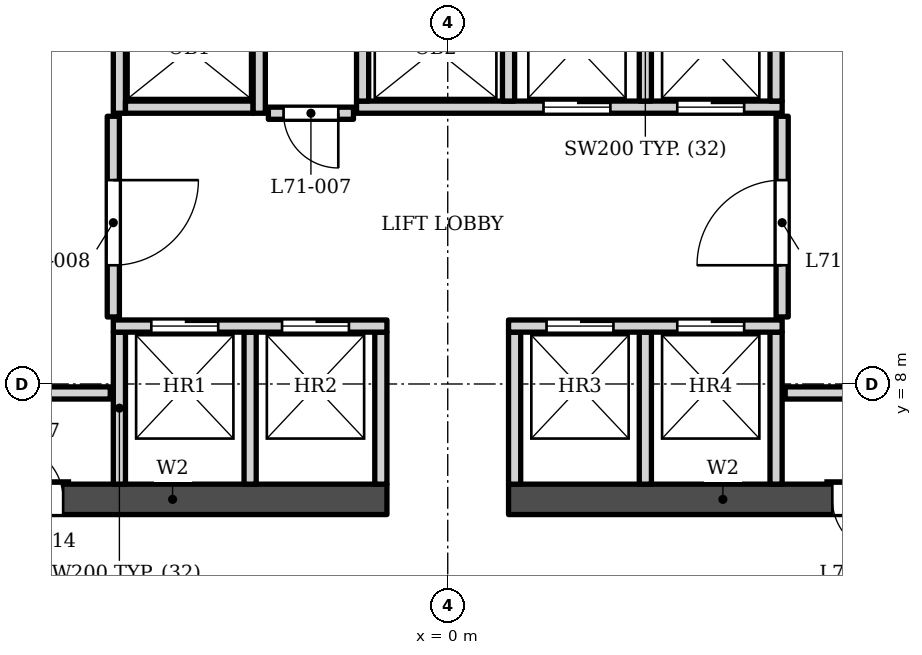
"""IFC4 building model, lengths in metres.
Left out: names, types, materials, properties, quantities, classifications, styles, units other than length and angle.
Written with IfcOpenShell. Run it as: python <this file> out.ifc"""

import sys

from ifc_helpers import new_model, si_unit, direction, frame, frame_2d, origin, place, context, subcontext, project, spatial, rectangle, extrude, element, fill, save


model = new_model("IFC4")
c1 = context("Model", 3, precision=1e-05, world=origin(), true_north=direction((0.0, 1.0)))
c2 = subcontext(c1, "Body", "Model", "MODEL_VIEW")
j1 = project(units=[si_unit("LENGTHUNIT", "METRE"), si_unit("PLANEANGLEUNIT", "RADIAN")], contexts=[c1])
p1 = place(None, origin())
s1 = spatial("IfcSite", under=j1, at=p1, CompositionType="ELEMENT")
p2 = place(p1, origin())
s2 = spatial("IfcBuilding", under=s1, at=p2, CompositionType="ELEMENT")
p3 = place(p2, frame((0.0, 0.0, 295.0)))
s3 = spatial("IfcBuildingStorey", under=s2, at=p3, CompositionType="ELEMENT", Elevation=295.0)
p4 = place(p3, frame((-8.05, 6.103, 0.0), z_axis=(0.0, 0.0, 1.0), x_axis=(1.0, 0.0, 0.0)))
e1 = element("IfcWall", 1, at=p4, inside=s3, PredefinedType="SHEAR", context=c2, shape_type="SweptSolid", body=[
    extrude(rectangle(XDim=7.05, YDim=0.5, at=frame_2d((3.525, 0.0))), origin(), (0.0, 0.0, 1.0), 7.5),
])
p5 = place(p4, frame((0.825, 0.0, 0.0)))
e2 = element("IfcOpeningElement", 2, at=p5, cuts=e1, PredefinedType="OPENING", context=c2, shape_type="SweptSolid", body=[
    extrude(rectangle(XDim=0.9, YDim=2.1, at=frame_2d((0.45, 1.05))), frame((0.0, 0.26, 0.0), z_axis=(0.0, -1.0, 0.0), x_axis=(1.0, 0.0, 0.0)), (0.0, 0.0, 1.0), 0.52),
])
p6 = place(p3, frame((1.0, 6.103, 0.0), z_axis=(0.0, 0.0, 1.0), x_axis=(1.0, 0.0, 0.0)))
e3 = element("IfcWall", 3, at=p6, inside=s3, PredefinedType="SHEAR", context=c2, shape_type="SweptSolid", body=[
    extrude(rectangle(XDim=7.05, YDim=0.5, at=frame_2d((3.525, 0.0))), origin(), (0.0, 0.0, 1.0), 7.5),
])
p7 = place(p6, frame((5.325, 0.0, 0.0)))
e4 = element("IfcOpeningElement", 4, at=p7, cuts=e3, PredefinedType="OPENING", context=c2, shape_type="SweptSolid", body=[
    extrude(rectangle(XDim=0.9, YDim=2.1, at=frame_2d((0.45, 1.05))), frame((0.0, 0.26, 0.0), z_axis=(0.0, -1.0, 0.0), x_axis=(1.0, 0.0, 0.0)), (0.0, 0.0, 1.0), 0.52),
])
for number, where, z_axis, x_axis in (
    (5, (-5.4, 6.353, 0.0), (0.0, 0.0, 1.0), (0.0, 1.0, 0.0)),
    (6, (-3.25, 6.353, 0.0), (0.0, 0.0, 1.0), (0.0, 1.0, 0.0)),
    (7, (-1.1, 6.353, 0.0), (0.0, 0.0, 1.0), (0.0, 1.0, 0.0)),
    (8, (1.1, 6.353, 0.0), (0.0, 0.0, 1.0), (0.0, 1.0, 0.0)),
    (9, (3.25, 6.353, 0.0), (0.0, 0.0, 1.0), (0.0, 1.0, 0.0)),
    (10, (5.4, 6.353, 0.0), (0.0, 0.0, 1.0), (0.0, 1.0, 0.0)),
    (11, (-8.05, 7.853, 0.0), (0.0, 0.0, 1.0), (1.0, 0.0, 0.0)),
    (12, (5.55, 7.853, 0.0), (0.0, 0.0, 1.0), (1.0, 0.0, 0.0)),
):
    element("IfcWall", number, at=place(p3, frame(where, z_axis=z_axis, x_axis=x_axis)), inside=s3, PredefinedType="SOLIDWALL", context=c2, shape_type="SweptSolid", body=[
        extrude(rectangle(XDim=2.5, YDim=0.2, at=frame_2d((1.25, 0.0))), origin(), (0.0, 0.0, 1.0), 7.2),
    ])
p8 = place(p3, frame((-5.5, 8.953, 0.0), z_axis=(0.0, 0.0, 1.0), x_axis=(1.0, 0.0, 0.0)))
e13 = element("IfcWall", 13, at=p8, inside=s3, PredefinedType="SOLIDWALL", context=c2, shape_type="SweptSolid", body=[
    extrude(rectangle(XDim=4.5, YDim=0.2, at=frame_2d((2.25, 0.0))), origin(), (0.0, 0.0, 1.0), 7.2),
])
p9 = place(p8, frame((0.625, 0.0, 0.0)))
e14 = element("IfcOpeningElement", 14, at=p9, cuts=e13, PredefinedType="OPENING", context=c2, shape_type="SweptSolid", body=[
    extrude(rectangle(XDim=1.1, YDim=2.1, at=frame_2d((0.55, 1.05))), frame((0.0, 0.11, 0.0), z_axis=(0.0, -1.0, 0.0), x_axis=(1.0, 0.0, 0.0)), (0.0, 0.0, 1.0), 0.22),
])
p10 = place(p8, frame((2.775, 0.0, 0.0)))
e15 = element("IfcOpeningElement", 15, at=p10, cuts=e13, PredefinedType="OPENING", context=c2, shape_type="SweptSolid", body=[
    extrude(rectangle(XDim=1.1, YDim=2.1, at=frame_2d((0.55, 1.05))), frame((0.0, 0.11, 0.0), z_axis=(0.0, -1.0, 0.0), x_axis=(1.0, 0.0, 0.0)), (0.0, 0.0, 1.0), 0.22),
])
p11 = place(p3, frame((1.0, 8.953, 0.0), z_axis=(0.0, 0.0, 1.0), x_axis=(1.0, 0.0, 0.0)))
e16 = element("IfcWall", 16, at=p11, inside=s3, PredefinedType="SOLIDWALL", context=c2, shape_type="SweptSolid", body=[
    extrude(rectangle(XDim=4.5, YDim=0.2, at=frame_2d((2.25, 0.0))), origin(), (0.0, 0.0, 1.0), 7.2),
])
p12 = place(p11, frame((0.625, 0.0, 0.0)))
e17 = element("IfcOpeningElement", 17, at=p12, cuts=e16, PredefinedType="OPENING", context=c2, shape_type="SweptSolid", body=[
    extrude(rectangle(XDim=1.1, YDim=2.1, at=frame_2d((0.55, 1.05))), frame((0.0, 0.11, 0.0), z_axis=(0.0, -1.0, 0.0), x_axis=(1.0, 0.0, 0.0)), (0.0, 0.0, 1.0), 0.22),
])
p13 = place(p11, frame((2.775, 0.0, 0.0)))
e18 = element("IfcOpeningElement", 18, at=p13, cuts=e16, PredefinedType="OPENING", context=c2, shape_type="SweptSolid", body=[
    extrude(rectangle(XDim=1.1, YDim=2.1, at=frame_2d((0.55, 1.05))), frame((0.0, 0.11, 0.0), z_axis=(0.0, -1.0, 0.0), x_axis=(1.0, 0.0, 0.0)), (0.0, 0.0, 1.0), 0.22),
])
p14 = place(p3, frame((-5.5, 9.103, 0.0), z_axis=(0.0, 0.0, 1.0), x_axis=(0.0, 1.0, 0.0)))
e19 = element("IfcWall", 19, at=p14, inside=s3, PredefinedType="SOLIDWALL", context=c2, shape_type="SweptSolid", body=[
    extrude(rectangle(XDim=3.3, YDim=0.2, at=frame_2d((1.65, 0.0))), origin(), (0.0, 0.0, 1.0), 7.2),
])
p15 = place(p14, frame((0.85, 0.0, 0.0)))
e20 = element("IfcOpeningElement", 20, at=p15, cuts=e19, PredefinedType="OPENING", context=c2, shape_type="SweptSolid", body=[
    extrude(rectangle(XDim=1.4, YDim=2.1, at=frame_2d((0.7, 1.05))), frame((0.0, 0.11, 0.0), z_axis=(0.0, -1.0, 0.0), x_axis=(1.0, 0.0, 0.0)), (0.0, 0.0, 1.0), 0.22),
])
p16 = place(p3, frame((5.5, 9.103, 0.0), z_axis=(0.0, 0.0, 1.0), x_axis=(0.0, 1.0, 0.0)))
e21 = element("IfcWall", 21, at=p16, inside=s3, PredefinedType="SOLIDWALL", context=c2, shape_type="SweptSolid", body=[
    extrude(rectangle(XDim=3.3, YDim=0.2, at=frame_2d((1.65, 0.0))), origin(), (0.0, 0.0, 1.0), 7.2),
])
p17 = place(p16, frame((0.85, 0.0, 0.0)))
e22 = element("IfcOpeningElement", 22, at=p17, cuts=e21, PredefinedType="OPENING", context=c2, shape_type="SweptSolid", body=[
    extrude(rectangle(XDim=1.4, YDim=2.1, at=frame_2d((0.7, 1.05))), frame((0.0, 0.11, 0.0), z_axis=(0.0, -1.0, 0.0), x_axis=(1.0, 0.0, 0.0)), (0.0, 0.0, 1.0), 0.22),
])
p18 = place(p3, frame((-2.95, 12.453, 0.0), z_axis=(0.0, 0.0, 1.0), x_axis=(1.0, 0.0, 0.0)))
e23 = element("IfcWall", 23, at=p18, inside=s3, PredefinedType="SOLIDWALL", context=c2, shape_type="SweptSolid", body=[
    extrude(rectangle(XDim=1.4, YDim=0.2, at=frame_2d((0.7, 0.0))), origin(), (0.0, 0.0, 1.0), 7.2),
])
p19 = place(p18, frame((0.25, 0.0, 0.0)))
e24 = element("IfcOpeningElement", 24, at=p19, cuts=e23, PredefinedType="OPENING", context=c2, shape_type="SweptSolid", body=[
    extrude(rectangle(XDim=0.9, YDim=2.1, at=frame_2d((0.45, 1.05))), frame((0.0, 0.11, 0.0), z_axis=(0.0, -1.0, 0.0), x_axis=(1.0, 0.0, 0.0)), (0.0, 0.0, 1.0), 0.22),
])
p20 = place(p3, frame((-5.4, 12.453, 0.0), z_axis=(0.0, 0.0, 1.0), x_axis=(0.0, 1.0, 0.0)))
e25 = element("IfcWall", 25, at=p20, inside=s3, PredefinedType="SOLIDWALL", context=c2, shape_type="SweptSolid", body=[
    extrude(rectangle(XDim=3.0, YDim=0.2, at=frame_2d((1.5, 0.0))), origin(), (0.0, 0.0, 1.0), 7.2),
])
p21 = place(p3, frame((-5.3, 12.552, 0.0), z_axis=(0.0, 0.0, 1.0), x_axis=(1.0, 0.0, 0.0)))
e26 = element("IfcWall", 26, at=p21, inside=s3, PredefinedType="SOLIDWALL", context=c2, shape_type="SweptSolid", body=[
    extrude(rectangle(XDim=2.1, YDim=0.2, at=frame_2d((1.05, 0.0))), origin(), (0.0, 0.0, 1.0), 7.2),
])
p22 = place(p3, frame((-3.1, 12.453, 0.0), z_axis=(0.0, 0.0, 1.0), x_axis=(0.0, 1.0, 0.0)))
e27 = element("IfcWall", 27, at=p22, inside=s3, PredefinedType="SOLIDWALL", context=c2, shape_type="SweptSolid", body=[
    extrude(rectangle(XDim=3.0, YDim=0.2, at=frame_2d((1.5, 0.0))), origin(), (0.0, 0.0, 1.0), 7.2),
])
p23 = place(p3, frame((-1.5, 12.552, 0.0), z_axis=(0.0, 0.0, 1.0), x_axis=(1.0, 0.0, 0.0)))
e28 = element("IfcWall", 28, at=p23, inside=s3, PredefinedType="SOLIDWALL", context=c2, shape_type="SweptSolid", body=[
    extrude(rectangle(XDim=7.0, YDim=0.2, at=frame_2d((3.5, 0.0))), origin(), (0.0, 0.0, 1.0), 7.2),
])
p24 = place(p23, frame((3.075, 0.0, 0.0)))
e29 = element("IfcOpeningElement", 29, at=p24, cuts=e28, PredefinedType="OPENING", context=c2, shape_type="SweptSolid", body=[
    extrude(rectangle(XDim=1.1, YDim=2.1, at=frame_2d((0.55, 1.05))), frame((0.0, 0.11, 0.0), z_axis=(0.0, -1.0, 0.0), x_axis=(1.0, 0.0, 0.0)), (0.0, 0.0, 1.0), 0.22),
])
p25 = place(p23, frame((5.275, 0.0, 0.0)))
e30 = element("IfcOpeningElement", 30, at=p25, cuts=e28, PredefinedType="OPENING", context=c2, shape_type="SweptSolid", body=[
    extrude(rectangle(XDim=1.1, YDim=2.1, at=frame_2d((0.55, 1.05))), frame((0.0, 0.11, 0.0), z_axis=(0.0, -1.0, 0.0), x_axis=(1.0, 0.0, 0.0)), (0.0, 0.0, 1.0), 0.22),
])
for number, where, z_axis, x_axis in (
    (31, (-1.4, 12.653, 0.0), (0.0, 0.0, 1.0), (0.0, 1.0, 0.0)),
    (32, (1.0, 12.653, 0.0), (0.0, 0.0, 1.0), (0.0, 1.0, 0.0)),
    (33, (3.25, 12.653, 0.0), (0.0, 0.0, 1.0), (0.0, 1.0, 0.0)),
):
    element("IfcWall", number, at=place(p3, frame(where, z_axis=z_axis, x_axis=x_axis)), inside=s3, PredefinedType="SOLIDWALL", context=c2, shape_type="SweptSolid", body=[
        extrude(rectangle(XDim=2.6, YDim=0.2, at=frame_2d((1.3, 0.0))), origin(), (0.0, 0.0, 1.0), 7.2),
    ])
p26 = place(p3, frame((5.4, 12.653, 0.0), z_axis=(0.0, 0.0, 1.0), x_axis=(0.0, 1.0, 0.0)))
e34 = element("IfcWall", 34, at=p26, inside=s3, PredefinedType="SOLIDWALL", context=c2, shape_type="SweptSolid", body=[
    extrude(rectangle(XDim=1.6, YDim=0.2, at=frame_2d((0.8, 0.0))), origin(), (0.0, 0.0, 1.0), 7.2),
])
p27 = place(p9, origin())
e35 = element("IfcDoor", 35, at=p27, inside=s3, OperationType="DOUBLE_DOOR_SLIDING", PredefinedType="DOOR", context=c2, shape_type="SweptSolid", body=[
    extrude(rectangle(XDim=1.1, YDim=2.1, at=frame_2d((0.55, 1.05))), frame((0.0, 0.025, 0.0), z_axis=(0.0, -1.0, 0.0), x_axis=(1.0, 0.0, 0.0)), (0.0, 0.0, 1.0), 0.05),
])
fill(e14, e35)
p28 = place(p10, origin())
e36 = element("IfcDoor", 36, at=p28, inside=s3, OperationType="DOUBLE_DOOR_SLIDING", PredefinedType="DOOR", context=c2, shape_type="SweptSolid", body=[
    extrude(rectangle(XDim=1.1, YDim=2.1, at=frame_2d((0.55, 1.05))), frame((0.0, 0.025, 0.0), z_axis=(0.0, -1.0, 0.0), x_axis=(1.0, 0.0, 0.0)), (0.0, 0.0, 1.0), 0.05),
])
fill(e15, e36)
p29 = place(p12, origin())
e37 = element("IfcDoor", 37, at=p29, inside=s3, OperationType="DOUBLE_DOOR_SLIDING", PredefinedType="DOOR", context=c2, shape_type="SweptSolid", body=[
    extrude(rectangle(XDim=1.1, YDim=2.1, at=frame_2d((0.55, 1.05))), frame((0.0, 0.025, 0.0), z_axis=(0.0, -1.0, 0.0), x_axis=(1.0, 0.0, 0.0)), (0.0, 0.0, 1.0), 0.05),
])
fill(e17, e37)
p30 = place(p13, origin())
e38 = element("IfcDoor", 38, at=p30, inside=s3, OperationType="DOUBLE_DOOR_SLIDING", PredefinedType="DOOR", context=c2, shape_type="SweptSolid", body=[
    extrude(rectangle(XDim=1.1, YDim=2.1, at=frame_2d((0.55, 1.05))), frame((0.0, 0.025, 0.0), z_axis=(0.0, -1.0, 0.0), x_axis=(1.0, 0.0, 0.0)), (0.0, 0.0, 1.0), 0.05),
])
fill(e18, e38)
p31 = place(p24, origin())
e39 = element("IfcDoor", 39, at=p31, inside=s3, OperationType="DOUBLE_DOOR_SLIDING", PredefinedType="DOOR", context=c2, shape_type="SweptSolid", body=[
    extrude(rectangle(XDim=1.1, YDim=2.1, at=frame_2d((0.55, 1.05))), frame((0.0, 0.025, 0.0), z_axis=(0.0, -1.0, 0.0), x_axis=(1.0, 0.0, 0.0)), (0.0, 0.0, 1.0), 0.05),
])
fill(e29, e39)
p32 = place(p25, origin())
e40 = element("IfcDoor", 40, at=p32, inside=s3, OperationType="DOUBLE_DOOR_SLIDING", PredefinedType="DOOR", context=c2, shape_type="SweptSolid", body=[
    extrude(rectangle(XDim=1.1, YDim=2.1, at=frame_2d((0.55, 1.05))), frame((0.0, 0.025, 0.0), z_axis=(0.0, -1.0, 0.0), x_axis=(1.0, 0.0, 0.0)), (0.0, 0.0, 1.0), 0.05),
])
fill(e30, e40)
p33 = place(p19, origin())
e41 = element("IfcDoor", 41, at=p33, inside=s3, OperationType="SINGLE_SWING_RIGHT", PredefinedType="DOOR", context=c2, shape_type="SweptSolid", body=[
    extrude(rectangle(XDim=0.9, YDim=2.1, at=frame_2d((0.45, 1.05))), frame((0.0, 0.025, 0.0), z_axis=(0.0, -1.0, 0.0), x_axis=(1.0, 0.0, 0.0)), (0.0, 0.0, 1.0), 0.05),
])
fill(e24, e41)
p34 = place(p15, origin())
e42 = element("IfcDoor", 42, at=p34, inside=s3, OperationType="SINGLE_SWING_RIGHT", PredefinedType="DOOR", context=c2, shape_type="SweptSolid", body=[
    extrude(rectangle(XDim=1.4, YDim=2.1, at=frame_2d((0.7, 1.05))), frame((0.0, 0.025, 0.0), z_axis=(0.0, -1.0, 0.0), x_axis=(1.0, 0.0, 0.0)), (0.0, 0.0, 1.0), 0.05),
])
fill(e20, e42)
p35 = place(p17, origin())
e43 = element("IfcDoor", 43, at=p35, inside=s3, OperationType="SINGLE_SWING_LEFT", PredefinedType="DOOR", context=c2, shape_type="SweptSolid", body=[
    extrude(rectangle(XDim=1.4, YDim=2.1, at=frame_2d((0.7, 1.05))), frame((0.0, 0.025, 0.0), z_axis=(0.0, -1.0, 0.0), x_axis=(1.0, 0.0, 0.0)), (0.0, 0.0, 1.0), 0.05),
])
fill(e22, e43)
p36 = place(p5, origin())
e44 = element("IfcDoor", 44, at=p36, inside=s3, OperationType="SINGLE_SWING_LEFT", PredefinedType="DOOR", context=c2, shape_type="SweptSolid", body=[
    extrude(rectangle(XDim=0.9, YDim=2.1, at=frame_2d((0.45, 1.05))), frame((0.0, 0.025, 0.0), z_axis=(0.0, -1.0, 0.0), x_axis=(1.0, 0.0, 0.0)), (0.0, 0.0, 1.0), 0.05),
])
fill(e2, e44)
p37 = place(p7, origin())
e45 = element("IfcDoor", 45, at=p37, inside=s3, OperationType="SINGLE_SWING_RIGHT", PredefinedType="DOOR", context=c2, shape_type="SweptSolid", body=[
    extrude(rectangle(XDim=0.9, YDim=2.1, at=frame_2d((0.45, 1.05))), frame((0.0, 0.025, 0.0), z_axis=(0.0, -1.0, 0.0), x_axis=(1.0, 0.0, 0.0)), (0.0, 0.0, 1.0), 0.05),
])
fill(e4, e45)
save(model, sys.argv[1])
